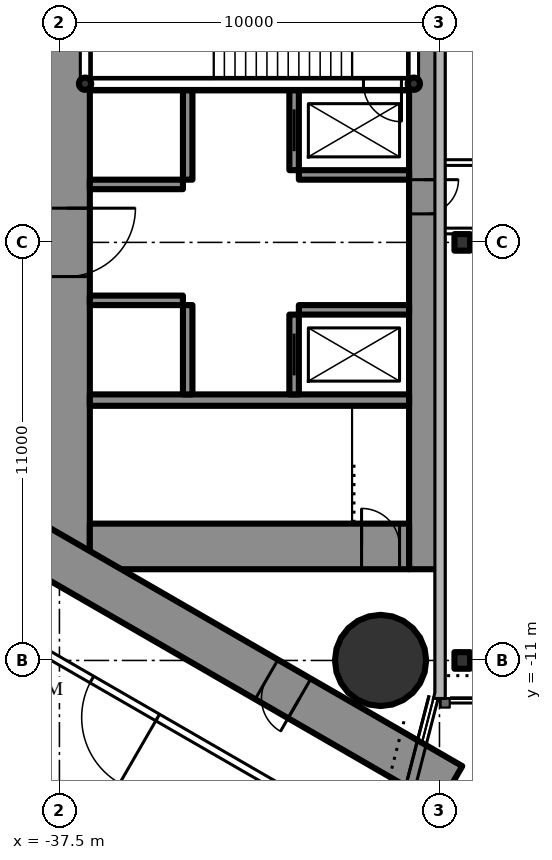
"""IFC4 building model, lengths in metres.
Left out: names, types, materials, properties, quantities, classifications, styles, units other than length and angle.
Written with IfcOpenShell. Run it as: python <this file> out.ifc"""

import sys

from ifc_helpers import new_model, si_unit, direction, frame, frame_2d, origin, origin_2d, place, context, subcontext, project, spatial, rectangle, circle, hollow_circle, i_section, extrude, element, fill, save


model = new_model("IFC4")
c1 = context("Model", 3, precision=1e-05, world=origin(), true_north=direction((0.0, 1.0)))
c2 = subcontext(c1, "Body", "Model", "MODEL_VIEW")
j1 = project(units=[si_unit("LENGTHUNIT", "METRE"), si_unit("PLANEANGLEUNIT", "RADIAN")], contexts=[c1])
p1 = place(None, origin())
s1 = spatial("IfcSite", under=j1, at=p1, CompositionType="ELEMENT")
p2 = place(p1, origin())
s2 = spatial("IfcBuilding", under=s1, at=p2, CompositionType="ELEMENT")
p3 = place(p2, frame((0.0, 0.0, 268.3)))
s3 = spatial("IfcBuildingStorey", under=s2, at=p3, CompositionType="ELEMENT", Elevation=268.3)
p4 = place(p3, frame((-29.05, -11.0, 0.0), z_axis=(0.0, 0.0, 1.0), x_axis=(1.0, 0.0, 0.0)))
e1 = element("IfcColumn", 1, at=p4, inside=s3, PredefinedType="COLUMN", context=c2, shape_type="SweptSolid", body=[
    extrude(circle(Radius=1.2, at=origin_2d()), origin(), (0.0, 0.0, 1.0), 5.0),
])
p5 = place(p3, frame((-27.9, 8.6, 0.0), z_axis=(0.0, 0.0, 1.0), x_axis=(0.0, -1.0, 0.0)))
e2 = element("IfcWall", 2, at=p5, inside=s3, PredefinedType="SHEAR", context=c2, shape_type="SweptSolid", body=[
    extrude(rectangle(XDim=17.2, YDim=0.8, at=frame_2d((8.6, 0.0))), origin(), (0.0, 0.0, 1.0), 5.0),
])
p6 = place(p5, frame((6.95, 0.0, 0.0)))
e3 = element("IfcOpeningElement", 3, at=p6, cuts=e2, PredefinedType="OPENING", context=c2, shape_type="SweptSolid", body=[
    extrude(rectangle(XDim=0.9, YDim=2.2, at=frame_2d((0.45, 1.1))), frame((0.0, 0.41, 0.0), z_axis=(0.0, -1.0, 0.0), x_axis=(1.0, 0.0, 0.0)), (0.0, 0.0, 1.0), 0.82),
])
p7 = place(p3, frame((-37.3, 8.6, 0.0), z_axis=(0.0, 0.0, 1.0), x_axis=(0.0, -1.0, 0.0)))
e4 = element("IfcWall", 4, at=p7, inside=s3, PredefinedType="SHEAR", context=c2, shape_type="SweptSolid", body=[
    extrude(rectangle(XDim=17.2, YDim=1.2, at=frame_2d((8.6, 0.0))), origin(), (0.0, 0.0, 1.0), 5.0),
])
p8 = place(p7, frame((7.7, 0.0, 0.0)))
e5 = element("IfcOpeningElement", 5, at=p8, cuts=e4, PredefinedType="OPENING", context=c2, shape_type="SweptSolid", body=[
    extrude(rectangle(XDim=1.8, YDim=2.2, at=frame_2d((0.9, 1.1))), frame((0.0, 0.61, 0.0), z_axis=(0.0, -1.0, 0.0), x_axis=(1.0, 0.0, 0.0)), (0.0, 0.0, 1.0), 1.22),
])
p9 = place(p3, frame((-28.3, -8.0, 0.0), z_axis=(0.0, 0.0, 1.0), x_axis=(-1.0, 0.0, 0.0)))
e6 = element("IfcWall", 6, at=p9, inside=s3, PredefinedType="SHEAR", context=c2, shape_type="SweptSolid", body=[
    extrude(rectangle(XDim=8.4, YDim=1.2, at=frame_2d((4.2, 0.0))), origin(), (0.0, 0.0, 1.0), 5.0),
])
p10 = place(p9, frame((0.25, 0.0, 0.0)))
e7 = element("IfcOpeningElement", 7, at=p10, cuts=e6, PredefinedType="OPENING", context=c2, shape_type="SweptSolid", body=[
    extrude(rectangle(XDim=1.0, YDim=2.2, at=frame_2d((0.5, 1.1))), frame((0.0, 0.61, 0.0), z_axis=(0.0, -1.0, 0.0), x_axis=(1.0, 0.0, 0.0)), (0.0, 0.0, 1.0), 1.22),
])
for number, where, z_axis, x_axis in (
    (8, (-28.3, 4.15, 0.0), (0.0, 0.0, 1.0), (-1.0, 0.0, 0.0)),
    (9, (-28.3, -4.15, 0.0), (0.0, 0.0, 1.0), (-1.0, 0.0, 0.0)),
):
    element("IfcWall", number, at=place(p3, frame(where, z_axis=z_axis, x_axis=x_axis)), inside=s3, PredefinedType="SHEAR", context=c2, shape_type="SweptSolid", body=[
        extrude(rectangle(XDim=8.4, YDim=0.3, at=frame_2d((4.2, 0.0))), origin(), (0.0, 0.0, 1.0), 5.0),
    ])
p11 = place(p3, frame((-31.325, 4.0, 0.0), z_axis=(0.0, 0.0, 1.0), x_axis=(0.0, -1.0, 0.0)))
e10 = element("IfcWall", 10, at=p11, inside=s3, PredefinedType="SHEAR", context=c2, shape_type="SweptSolid", body=[
    extrude(rectangle(XDim=2.1, YDim=0.25, at=frame_2d((1.05, 0.0))), origin(), (0.0, 0.0, 1.0), 5.0),
])
p12 = place(p11, frame((0.5, 0.0, 0.0)))
e11 = element("IfcOpeningElement", 11, at=p12, cuts=e10, PredefinedType="OPENING", context=c2, shape_type="SweptSolid", body=[
    extrude(rectangle(XDim=1.1, YDim=2.2, at=frame_2d((0.55, 1.1))), frame((0.0, 0.135, 0.0), z_axis=(0.0, -1.0, 0.0), x_axis=(1.0, 0.0, 0.0)), (0.0, 0.0, 1.0), 0.27),
])
p13 = place(p3, frame((-34.125, 4.0, 0.0), z_axis=(0.0, 0.0, 1.0), x_axis=(0.0, -1.0, 0.0)))
e12 = element("IfcWall", 12, at=p13, inside=s3, PredefinedType="SHEAR", context=c2, shape_type="SweptSolid", body=[
    extrude(rectangle(XDim=2.35, YDim=0.25, at=frame_2d((1.175, 0.0))), origin(), (0.0, 0.0, 1.0), 5.0),
])
p14 = place(p3, frame((-28.3, 1.775, 0.0), z_axis=(0.0, 0.0, 1.0), x_axis=(-1.0, 0.0, 0.0)))
e13 = element("IfcWall", 13, at=p14, inside=s3, PredefinedType="SHEAR", context=c2, shape_type="SweptSolid", body=[
    extrude(rectangle(XDim=2.9, YDim=0.25, at=frame_2d((1.45, 0.0))), origin(), (0.0, 0.0, 1.0), 5.0),
])
p15 = place(p3, frame((-34.25, 1.525, 0.0), z_axis=(0.0, 0.0, 1.0), x_axis=(-1.0, 0.0, 0.0)))
e14 = element("IfcWall", 14, at=p15, inside=s3, PredefinedType="SHEAR", context=c2, shape_type="SweptSolid", body=[
    extrude(rectangle(XDim=2.45, YDim=0.25, at=frame_2d((1.225, 0.0))), origin(), (0.0, 0.0, 1.0), 5.0),
])
p16 = place(p3, frame((-31.325, -1.9, 0.0), z_axis=(0.0, 0.0, 1.0), x_axis=(0.0, -1.0, 0.0)))
e15 = element("IfcWall", 15, at=p16, inside=s3, PredefinedType="SHEAR", context=c2, shape_type="SweptSolid", body=[
    extrude(rectangle(XDim=2.1, YDim=0.25, at=frame_2d((1.05, 0.0))), origin(), (0.0, 0.0, 1.0), 5.0),
])
p17 = place(p16, frame((0.5, 0.0, 0.0)))
e16 = element("IfcOpeningElement", 16, at=p17, cuts=e15, PredefinedType="OPENING", context=c2, shape_type="SweptSolid", body=[
    extrude(rectangle(XDim=1.1, YDim=2.2, at=frame_2d((0.55, 1.1))), frame((0.0, 0.135, 0.0), z_axis=(0.0, -1.0, 0.0), x_axis=(1.0, 0.0, 0.0)), (0.0, 0.0, 1.0), 0.27),
])
p18 = place(p3, frame((-34.125, -1.65, 0.0), z_axis=(0.0, 0.0, 1.0), x_axis=(0.0, -1.0, 0.0)))
e17 = element("IfcWall", 17, at=p18, inside=s3, PredefinedType="SHEAR", context=c2, shape_type="SweptSolid", body=[
    extrude(rectangle(XDim=2.35, YDim=0.25, at=frame_2d((1.175, 0.0))), origin(), (0.0, 0.0, 1.0), 5.0),
])
p19 = place(p3, frame((-28.3, -1.775, 0.0), z_axis=(0.0, 0.0, 1.0), x_axis=(-1.0, 0.0, 0.0)))
e18 = element("IfcWall", 18, at=p19, inside=s3, PredefinedType="SHEAR", context=c2, shape_type="SweptSolid", body=[
    extrude(rectangle(XDim=2.9, YDim=0.25, at=frame_2d((1.45, 0.0))), origin(), (0.0, 0.0, 1.0), 5.0),
])
p20 = place(p3, frame((-34.25, -1.525, 0.0), z_axis=(0.0, 0.0, 1.0), x_axis=(-1.0, 0.0, 0.0)))
e19 = element("IfcWall", 19, at=p20, inside=s3, PredefinedType="SHEAR", context=c2, shape_type="SweptSolid", body=[
    extrude(rectangle(XDim=2.45, YDim=0.25, at=frame_2d((1.225, 0.0))), origin(), (0.0, 0.0, 1.0), 5.0),
])
p21 = place(p3, frame((-27.2, 14.3, 0.0), z_axis=(0.0, 0.0, 1.0), x_axis=(-0.866026593062, -0.499997940104, 0.0)))
e20 = element("IfcWall", 20, at=p21, inside=s3, PredefinedType="SHEAR", context=c2, shape_type="SweptSolid", body=[
    extrude(rectangle(XDim=28.946, YDim=1.2, at=frame_2d((14.473, 0.0))), origin(), (0.0, 0.0, 1.0), 5.0),
])
p22 = place(p21, frame((4.6, 0.0, 0.0)))
e21 = element("IfcOpeningElement", 21, at=p22, cuts=e20, PredefinedType="OPENING", context=c2, shape_type="SweptSolid", body=[
    extrude(rectangle(XDim=1.0, YDim=2.2, at=frame_2d((0.5, 1.1))), frame((0.0, 0.61, 0.0), z_axis=(0.0, -1.0, 0.0), x_axis=(1.0, 0.0, 0.0)), (0.0, 0.0, 1.0), 1.22),
])
p23 = place(p21, frame((13.395, 0.0, 0.0)))
e22 = element("IfcOpeningElement", 22, at=p23, cuts=e20, PredefinedType="OPENING", context=c2, shape_type="SweptSolid", body=[
    extrude(rectangle(XDim=1.8, YDim=2.2, at=frame_2d((0.9, 1.1))), frame((0.0, 0.61, 0.0), z_axis=(0.0, -1.0, 0.0), x_axis=(1.0, 0.0, 0.0)), (0.0, 0.0, 1.0), 1.22),
])
p24 = place(p3, frame((-27.2, -14.3, 0.0), z_axis=(0.0, 0.0, 1.0), x_axis=(-0.866024021859, 0.500002393557, 0.0)))
e23 = element("IfcWall", 23, at=p24, inside=s3, PredefinedType="SHEAR", context=c2, shape_type="SweptSolid", body=[
    extrude(rectangle(XDim=27.907, YDim=1.2, at=frame_2d((13.954, 0.0))), origin(), (0.0, 0.0, 1.0), 5.0),
])
p25 = place(p24, frame((4.6, 0.0, 0.0)))
e24 = element("IfcOpeningElement", 24, at=p25, cuts=e23, PredefinedType="OPENING", context=c2, shape_type="SweptSolid", body=[
    extrude(rectangle(XDim=1.0, YDim=2.2, at=frame_2d((0.5, 1.1))), frame((0.0, 0.61, 0.0), z_axis=(0.0, -1.0, 0.0), x_axis=(1.0, 0.0, 0.0)), (0.0, 0.0, 1.0), 1.22),
])
p26 = place(p24, frame((13.395, 0.0, 0.0)))
e25 = element("IfcOpeningElement", 25, at=p26, cuts=e23, PredefinedType="OPENING", context=c2, shape_type="SweptSolid", body=[
    extrude(rectangle(XDim=1.8, YDim=2.2, at=frame_2d((0.9, 1.1))), frame((0.0, 0.61, 0.0), z_axis=(0.0, -1.0, 0.0), x_axis=(1.0, 0.0, 0.0)), (0.0, 0.0, 1.0), 1.22),
])
for number, where, z_axis, x_axis in (
    (26, (-26.9, -11.0, 0.0), (0.0, 0.0, 1.0), (1.0, 0.0, 0.0)),
    (27, (-26.9, 0.0, 0.0), (0.0, 0.0, 1.0), (1.0, 0.0, 0.0)),
):
    element("IfcColumn", number, at=place(p3, frame(where, z_axis=z_axis, x_axis=x_axis)), inside=s3, PredefinedType="COLUMN", context=c2, shape_type="SweptSolid", body=[
        extrude(i_section(OverallWidth=0.412, OverallDepth=0.437, WebThickness=0.036, FlangeThickness=0.058, FilletRadius=0.015, at=origin_2d()), origin(), (0.0, 0.0, 1.0), 5.0),
    ])
for number, where, z_axis, x_axis in (
    (28, (-28.175, 4.175, 5.0), (0.0, 0.0, 1.0), (1.0, 0.0, 0.0)),
    (29, (-36.825, 4.175, 5.0), (0.0, 0.0, 1.0), (1.0, 0.0, 0.0)),
):
    element("IfcColumn", number, at=place(p3, frame(where, z_axis=z_axis, x_axis=x_axis)), inside=s3, PredefinedType="COLUMN", context=c2, shape_type="SweptSolid", body=[
        extrude(hollow_circle(Radius=0.162, WallThickness=0.012, at=origin_2d()), origin(), (0.0, 0.0, 1.0), 3.0),
    ])
for number, where, z_axis, x_axis in (
    (30, (-28.175, 7.422, 5.0), (0.0, 0.0, 1.0), (0.0, -1.0, 0.0)),
    (31, (-36.825, 7.422, 5.0), (0.0, 0.0, 1.0), (0.0, -1.0, 0.0)),
):
    element("IfcWall", number, at=place(p3, frame(where, z_axis=z_axis, x_axis=x_axis)), inside=s3, PredefinedType="SOLIDWALL", context=c2, shape_type="SweptSolid", body=[
        extrude(rectangle(XDim=3.144, YDim=0.25, at=frame_2d((1.572, 0.0))), origin(), (0.0, 0.0, 1.0), 2.54),
    ])
p27 = place(p3, frame((-28.278, 4.175, 5.0), z_axis=(0.0, 0.0, 1.0), x_axis=(-1.0, 0.0, 0.0)))
e32 = element("IfcWall", 32, at=p27, inside=s3, PredefinedType="SOLIDWALL", context=c2, shape_type="SweptSolid", body=[
    extrude(rectangle(XDim=8.444, YDim=0.25, at=frame_2d((4.222, 0.0))), origin(), (0.0, 0.0, 1.0), 2.54),
])
p28 = place(p27, frame((0.222, 0.0, 0.0)))
e33 = element("IfcOpeningElement", 33, at=p28, cuts=e32, PredefinedType="OPENING", context=c2, shape_type="SweptSolid", body=[
    extrude(rectangle(XDim=1.0, YDim=2.2, at=frame_2d((0.5, 1.1))), frame((0.0, 0.135, 0.0), z_axis=(0.0, -1.0, 0.0), x_axis=(1.0, 0.0, 0.0)), (0.0, 0.0, 1.0), 0.27),
])
p29 = place(p3, frame((-28.737, 16.068, 0.0), z_axis=(0.0, 0.0, 1.0), x_axis=(-0.866026057212, -0.499998868229, 0.0)))
e34 = element("IfcWall", 34, at=p29, inside=s3, PredefinedType="PARTITIONING", context=c2, shape_type="SweptSolid", body=[
    extrude(rectangle(XDim=32.137, YDim=0.2, at=frame_2d((16.068, 0.0))), origin(), (0.0, 0.0, 1.0), 4.7),
])
p30 = place(p29, frame((7.134, 0.0, 0.0)))
e35 = element("IfcOpeningElement", 35, at=p30, cuts=e34, PredefinedType="OPENING", context=c2, shape_type="SweptSolid", body=[
    extrude(rectangle(XDim=2.0, YDim=2.4, at=frame_2d((1.0, 1.2))), frame((0.0, 0.11, 0.0), z_axis=(0.0, -1.0, 0.0), x_axis=(1.0, 0.0, 0.0)), (0.0, 0.0, 1.0), 0.22),
])
p31 = place(p29, frame((17.117, 0.0, 0.0)))
e36 = element("IfcOpeningElement", 36, at=p31, cuts=e34, PredefinedType="OPENING", context=c2, shape_type="SweptSolid", body=[
    extrude(rectangle(XDim=2.0, YDim=2.4, at=frame_2d((1.0, 1.2))), frame((0.0, 0.11, 0.0), z_axis=(0.0, -1.0, 0.0), x_axis=(1.0, 0.0, 0.0)), (0.0, 0.0, 1.0), 0.22),
])
p32 = place(p29, frame((21.266, 0.0, 0.0)))
e37 = element("IfcOpeningElement", 37, at=p32, cuts=e34, PredefinedType="OPENING", context=c2, shape_type="SweptSolid", body=[
    extrude(rectangle(XDim=2.0, YDim=2.4, at=frame_2d((1.0, 1.2))), frame((0.0, 0.11, 0.0), z_axis=(0.0, -1.0, 0.0), x_axis=(1.0, 0.0, 0.0)), (0.0, 0.0, 1.0), 0.22),
])
p33 = place(p29, frame((27.126, 0.0, 0.0)))
e38 = element("IfcOpeningElement", 38, at=p33, cuts=e34, PredefinedType="OPENING", context=c2, shape_type="SweptSolid", body=[
    extrude(rectangle(XDim=2.0, YDim=2.4, at=frame_2d((1.0, 1.2))), frame((0.0, 0.11, 0.0), z_axis=(0.0, -1.0, 0.0), x_axis=(1.0, 0.0, 0.0)), (0.0, 0.0, 1.0), 0.22),
])
p34 = place(p3, frame((-28.737, -16.068, 0.0), z_axis=(0.0, 0.0, 1.0), x_axis=(-0.866026220747, 0.499998584977, 0.0)))
e39 = element("IfcWall", 39, at=p34, inside=s3, PredefinedType="PARTITIONING", context=c2, shape_type="SweptSolid", body=[
    extrude(rectangle(XDim=32.017, YDim=0.2, at=frame_2d((16.008, 0.0))), origin(), (0.0, 0.0, 1.0), 4.7),
])
p35 = place(p34, frame((27.066, 0.0, 0.0)))
e40 = element("IfcOpeningElement", 40, at=p35, cuts=e39, PredefinedType="OPENING", context=c2, shape_type="SweptSolid", body=[
    extrude(rectangle(XDim=2.0, YDim=2.4, at=frame_2d((1.0, 1.2))), frame((0.0, 0.11, 0.0), z_axis=(0.0, -1.0, 0.0), x_axis=(1.0, 0.0, 0.0)), (0.0, 0.0, 1.0), 0.22),
])
p36 = place(p34, frame((21.266, 0.0, 0.0)))
e41 = element("IfcOpeningElement", 41, at=p36, cuts=e39, PredefinedType="OPENING", context=c2, shape_type="SweptSolid", body=[
    extrude(rectangle(XDim=2.0, YDim=2.4, at=frame_2d((1.0, 1.2))), frame((0.0, 0.11, 0.0), z_axis=(0.0, -1.0, 0.0), x_axis=(1.0, 0.0, 0.0)), (0.0, 0.0, 1.0), 0.22),
])
p37 = place(p34, frame((17.117, 0.0, 0.0)))
e42 = element("IfcOpeningElement", 42, at=p37, cuts=e39, PredefinedType="OPENING", context=c2, shape_type="SweptSolid", body=[
    extrude(rectangle(XDim=2.0, YDim=2.4, at=frame_2d((1.0, 1.2))), frame((0.0, 0.11, 0.0), z_axis=(0.0, -1.0, 0.0), x_axis=(1.0, 0.0, 0.0)), (0.0, 0.0, 1.0), 0.22),
])
p38 = place(p34, frame((7.134, 0.0, 0.0)))
e43 = element("IfcOpeningElement", 43, at=p38, cuts=e39, PredefinedType="OPENING", context=c2, shape_type="SweptSolid", body=[
    extrude(rectangle(XDim=2.0, YDim=2.4, at=frame_2d((1.0, 1.2))), frame((0.0, 0.11, 0.0), z_axis=(0.0, -1.0, 0.0), x_axis=(1.0, 0.0, 0.0)), (0.0, 0.0, 1.0), 0.22),
])
p39 = place(p3, frame((-27.5, 0.3, 0.0), z_axis=(0.0, 0.0, 1.0), x_axis=(1.0, 0.0, 0.0)))
e44 = element("IfcWall", 44, at=p39, inside=s3, PredefinedType="PARTITIONING", context=c2, shape_type="SweptSolid", body=[
    extrude(rectangle(XDim=55.0, YDim=0.15, at=frame_2d((27.5, 0.0))), origin(), (0.0, 0.0, 1.0), 4.163),
])
p40 = place(p39, frame((7.25, 0.0, 0.0)))
e45 = element("IfcOpeningElement", 45, at=p40, cuts=e44, PredefinedType="OPENING", context=c2, shape_type="SweptSolid", body=[
    extrude(rectangle(XDim=2.0, YDim=2.4, at=frame_2d((1.0, 1.2))), frame((0.0, 0.085, 0.0), z_axis=(0.0, -1.0, 0.0), x_axis=(1.0, 0.0, 0.0)), (0.0, 0.0, 1.0), 0.17),
])
p41 = place(p39, frame((29.25, 0.0, 0.0)))
e46 = element("IfcOpeningElement", 46, at=p41, cuts=e44, PredefinedType="OPENING", context=c2, shape_type="SweptSolid", body=[
    extrude(rectangle(XDim=2.0, YDim=2.4, at=frame_2d((1.0, 1.2))), frame((0.0, 0.085, 0.0), z_axis=(0.0, -1.0, 0.0), x_axis=(1.0, 0.0, 0.0)), (0.0, 0.0, 1.0), 0.17),
])
p42 = place(p39, frame((45.75, 0.0, 0.0)))
e47 = element("IfcOpeningElement", 47, at=p42, cuts=e44, PredefinedType="OPENING", context=c2, shape_type="SweptSolid", body=[
    extrude(rectangle(XDim=2.0, YDim=2.4, at=frame_2d((1.0, 1.2))), frame((0.0, 0.085, 0.0), z_axis=(0.0, -1.0, 0.0), x_axis=(1.0, 0.0, 0.0)), (0.0, 0.0, 1.0), 0.17),
])
p43 = place(p3, frame((-27.5, 2.1, 0.0), z_axis=(0.0, 0.0, 1.0), x_axis=(1.0, 0.0, 0.0)))
e48 = element("IfcWall", 48, at=p43, inside=s3, PredefinedType="PARTITIONING", context=c2, shape_type="SweptSolid", body=[
    extrude(rectangle(XDim=55.0, YDim=0.15, at=frame_2d((27.5, 0.0))), origin(), (0.0, 0.0, 1.0), 4.7),
])
p44 = place(p43, frame((7.25, 0.0, 0.0)))
e49 = element("IfcOpeningElement", 49, at=p44, cuts=e48, PredefinedType="OPENING", context=c2, shape_type="SweptSolid", body=[
    extrude(rectangle(XDim=2.0, YDim=2.4, at=frame_2d((1.0, 1.2))), frame((0.0, 0.085, 0.0), z_axis=(0.0, -1.0, 0.0), x_axis=(1.0, 0.0, 0.0)), (0.0, 0.0, 1.0), 0.17),
])
p45 = place(p43, frame((29.25, 0.0, 0.0)))
e50 = element("IfcOpeningElement", 50, at=p45, cuts=e48, PredefinedType="OPENING", context=c2, shape_type="SweptSolid", body=[
    extrude(rectangle(XDim=2.0, YDim=2.4, at=frame_2d((1.0, 1.2))), frame((0.0, 0.085, 0.0), z_axis=(0.0, -1.0, 0.0), x_axis=(1.0, 0.0, 0.0)), (0.0, 0.0, 1.0), 0.17),
])
p46 = place(p43, frame((45.75, 0.0, 0.0)))
e51 = element("IfcOpeningElement", 51, at=p46, cuts=e48, PredefinedType="OPENING", context=c2, shape_type="SweptSolid", body=[
    extrude(rectangle(XDim=2.0, YDim=2.4, at=frame_2d((1.0, 1.2))), frame((0.0, 0.085, 0.0), z_axis=(0.0, -1.0, 0.0), x_axis=(1.0, 0.0, 0.0)), (0.0, 0.0, 1.0), 0.17),
])
p47 = place(p28, origin())
e52 = element("IfcDoor", 52, at=p47, inside=s3, OperationType="SINGLE_SWING_LEFT", PredefinedType="DOOR", context=c2, shape_type="SweptSolid", body=[
    extrude(rectangle(XDim=1.0, YDim=2.2, at=frame_2d((0.5, 1.1))), frame((0.0, 0.025, 0.0), z_axis=(0.0, -1.0, 0.0), x_axis=(1.0, 0.0, 0.0)), (0.0, 0.0, 1.0), 0.05),
])
fill(e33, e52)
p48 = place(p38, origin())
e53 = element("IfcDoor", 53, at=p48, inside=s3, OperationType="DOUBLE_DOOR_SINGLE_SWING", PredefinedType="DOOR", context=c2, shape_type="SweptSolid", body=[
    extrude(rectangle(XDim=2.0, YDim=2.4, at=frame_2d((1.0, 1.2))), frame((0.0, 0.025, 0.0), z_axis=(0.0, -1.0, 0.0), x_axis=(1.0, 0.0, 0.0)), (0.0, 0.0, 1.0), 0.05),
])
fill(e43, e53)
p49 = place(p25, origin())
e54 = element("IfcDoor", 54, at=p49, inside=s3, OperationType="SINGLE_SWING_LEFT", PredefinedType="DOOR", context=c2, shape_type="SweptSolid", body=[
    extrude(rectangle(XDim=1.0, YDim=2.2, at=frame_2d((0.5, 1.1))), frame((0.0, 0.025, 0.0), z_axis=(0.0, -1.0, 0.0), x_axis=(1.0, 0.0, 0.0)), (0.0, 0.0, 1.0), 0.05),
])
fill(e24, e54)
p50 = place(p8, origin())
e55 = element("IfcDoor", 55, at=p50, inside=s3, OperationType="DOUBLE_DOOR_SINGLE_SWING", PredefinedType="DOOR", context=c2, shape_type="SweptSolid", body=[
    extrude(rectangle(XDim=1.8, YDim=2.2, at=frame_2d((0.9, 1.1))), frame((0.0, 0.025, 0.0), z_axis=(0.0, -1.0, 0.0), x_axis=(1.0, 0.0, 0.0)), (0.0, 0.0, 1.0), 0.05),
])
fill(e5, e55)
p51 = place(p10, origin())
e56 = element("IfcDoor", 56, at=p51, inside=s3, OperationType="SINGLE_SWING_RIGHT", PredefinedType="DOOR", context=c2, shape_type="SweptSolid", body=[
    extrude(rectangle(XDim=1.0, YDim=2.2, at=frame_2d((0.5, 1.1))), frame((0.0, 0.025, 0.0), z_axis=(0.0, -1.0, 0.0), x_axis=(1.0, 0.0, 0.0)), (0.0, 0.0, 1.0), 0.05),
])
fill(e7, e56)
p52 = place(p6, origin())
e57 = element("IfcDoor", 57, at=p52, inside=s3, OperationType="SINGLE_SWING_LEFT", PredefinedType="DOOR", context=c2, shape_type="SweptSolid", body=[
    extrude(rectangle(XDim=0.9, YDim=2.2, at=frame_2d((0.45, 1.1))), frame((0.0, 0.025, 0.0), z_axis=(0.0, -1.0, 0.0), x_axis=(1.0, 0.0, 0.0)), (0.0, 0.0, 1.0), 0.05),
])
fill(e3, e57)
p53 = place(p12, origin())
e58 = element("IfcDoor", 58, at=p53, inside=s3, OperationType="SLIDING_TO_LEFT", PredefinedType="USERDEFINED", context=c2, shape_type="SweptSolid", body=[
    extrude(rectangle(XDim=1.1, YDim=2.2, at=frame_2d((0.55, 1.1))), frame((0.0, 0.025, 0.0), z_axis=(0.0, -1.0, 0.0), x_axis=(1.0, 0.0, 0.0)), (0.0, 0.0, 1.0), 0.05),
])
fill(e11, e58)
p54 = place(p17, origin())
e59 = element("IfcDoor", 59, at=p54, inside=s3, OperationType="SLIDING_TO_LEFT", PredefinedType="USERDEFINED", context=c2, shape_type="SweptSolid", body=[
    extrude(rectangle(XDim=1.1, YDim=2.2, at=frame_2d((0.55, 1.1))), frame((0.0, 0.025, 0.0), z_axis=(0.0, -1.0, 0.0), x_axis=(1.0, 0.0, 0.0)), (0.0, 0.0, 1.0), 0.05),
])
fill(e16, e59)
save(model, sys.argv[1])
